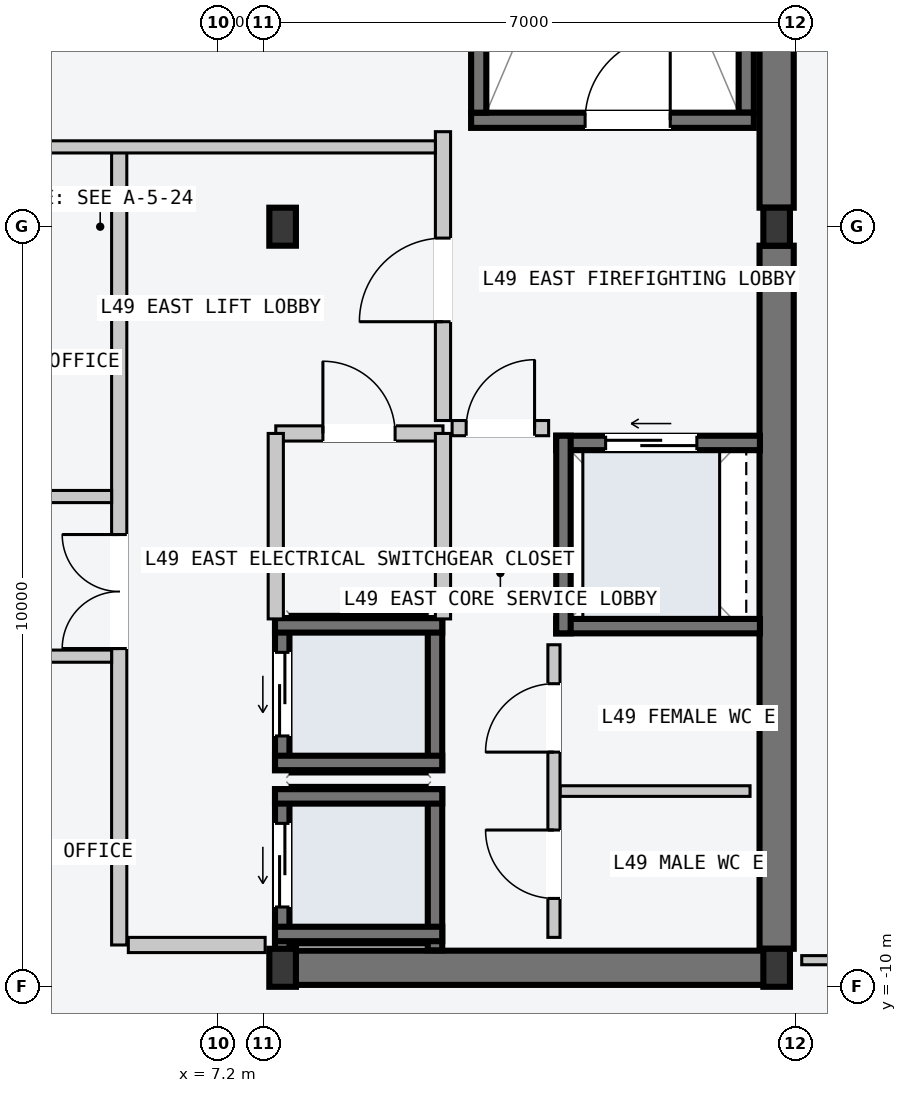
"""IFC4 building model, lengths in metres.
Left out: names, types, materials, properties, quantities, classifications, styles, units other than length and angle.
Written with IfcOpenShell. Run it as: python <this file> out.ifc"""

import sys

from ifc_helpers import new_model, si_unit, direction, frame, frame_2d, origin, origin_2d, place, context, subcontext, project, spatial, rectangle, i_section, extrude, element, fill, save


model = new_model("IFC4")
c1 = context("Model", 3, precision=1e-05, world=origin(), true_north=direction((0.0, 1.0)))
c2 = subcontext(c1, "Body", "Model", "MODEL_VIEW")
j1 = project(units=[si_unit("LENGTHUNIT", "METRE"), si_unit("PLANEANGLEUNIT", "RADIAN")], contexts=[c1])
p1 = place(None, origin())
s1 = spatial("IfcSite", under=j1, at=p1, CompositionType="ELEMENT")
p2 = place(p1, origin())
s2 = spatial("IfcBuilding", under=s1, at=p2, CompositionType="ELEMENT")
p3 = place(p2, frame((0.0, 0.0, 187.5)))
s3 = spatial("IfcBuildingStorey", under=s2, at=p3, CompositionType="ELEMENT", Elevation=187.5)
p4 = place(p3, frame((8.07, -9.75, -0.2), z_axis=(0.0, 0.0, 1.0), x_axis=(1.0, 0.0, 0.0)))
e1 = element("IfcWall", 1, at=p4, inside=s3, PredefinedType="SHEAR", context=c2, shape_type="SweptSolid", body=[
    extrude(rectangle(XDim=6.46, YDim=0.45, at=frame_2d((3.23, 0.0))), origin(), (0.0, 0.0, 1.0), 3.6),
])
for number, where, z_axis, x_axis in (
    (2, (14.55, -9.5, -0.2), (0.0, 0.0, 1.0), (0.0, 1.0, 0.0)),
    (3, (14.55, 0.25, -0.2), (0.0, 0.0, 1.0), (0.0, 1.0, 0.0)),
):
    element("IfcWall", number, at=place(p3, frame(where, z_axis=z_axis, x_axis=x_axis)), inside=s3, PredefinedType="SHEAR", context=c2, shape_type="SweptSolid", body=[
        extrude(rectangle(XDim=9.25, YDim=0.45, at=frame_2d((4.625, 0.0))), origin(), (0.0, 0.0, 1.0), 3.6),
    ])
p5 = place(p3, frame((14.15, 1.5, -0.2), z_axis=(0.0, 0.0, 1.0), x_axis=(0.0, 1.0, 0.0)))
e4 = element("IfcWall", 4, at=p5, inside=s3, PredefinedType="SOLIDWALL", context=c2, shape_type="SweptSolid", body=[
    extrude(rectangle(XDim=7.8, YDim=0.2, at=frame_2d((3.9, 0.0))), origin(), (0.0, 0.0, 1.0), 3.6),
])
p6 = place(p3, frame((10.53, 1.4, -0.2), z_axis=(0.0, 0.0, 1.0), x_axis=(1.0, 0.0, 0.0)))
e5 = element("IfcWall", 5, at=p6, inside=s3, PredefinedType="SOLIDWALL", context=c2, shape_type="SweptSolid", body=[
    extrude(rectangle(XDim=3.72, YDim=0.2, at=frame_2d((1.86, 0.0))), origin(), (0.0, 0.0, 1.0), 3.6),
])
p7 = place(p6, frame((1.5, 0.0, 0.2)))
e6 = element("IfcOpeningElement", 6, at=p7, cuts=e5, PredefinedType="OPENING", context=c2, shape_type="SweptSolid", body=[
    extrude(rectangle(XDim=1.12, YDim=2.18, at=frame_2d((0.56, 1.09))), frame((0.0, 0.11, 0.0), z_axis=(0.0, -1.0, 0.0), x_axis=(1.0, 0.0, 0.0)), (0.0, 0.0, 1.0), 0.22),
])
p8 = place(p3, frame((10.63, 1.5, -0.2), z_axis=(0.0, 0.0, 1.0), x_axis=(0.0, 1.0, 0.0)))
e7 = element("IfcWall", 7, at=p8, inside=s3, PredefinedType="SOLIDWALL", context=c2, shape_type="SweptSolid", body=[
    extrude(rectangle(XDim=7.8, YDim=0.2, at=frame_2d((3.9, 0.0))), origin(), (0.0, 0.0, 1.0), 3.6),
])
for number, where, z_axis, x_axis in (
    (8, (8.05, -9.75, 0.0), (0.0, 0.0, 1.0), (1.0, 0.0, 0.0)),
    (9, (8.05, 0.0, 0.0), (0.0, 0.0, 1.0), (1.0, 0.0, 0.0)),
    (10, (14.55, -9.75, 0.0), (0.0, 0.0, 1.0), (1.0, 0.0, 0.0)),
    (11, (14.55, 0.0, 0.0), (0.0, 0.0, 1.0), (1.0, 0.0, 0.0)),
):
    element("IfcColumn", number, at=place(p3, frame(where, z_axis=z_axis, x_axis=x_axis)), inside=s3, PredefinedType="COLUMN", context=c2, shape_type="SweptSolid", body=[
        extrude(i_section(OverallWidth=0.35, OverallDepth=0.5, WebThickness=0.02, FlangeThickness=0.032, at=origin_2d()), origin(), (0.0, 0.0, 1.0), 3.6),
    ])
p9 = place(p3, frame((8.045, -9.52, -0.2), z_axis=(0.0, 0.0, 1.0), x_axis=(0.0, 1.0, 0.0)))
e12 = element("IfcWall", 12, at=p9, inside=s3, PredefinedType="SOLIDWALL", context=c2, shape_type="SweptSolid", body=[
    extrude(rectangle(XDim=2.12, YDim=0.19, at=frame_2d((1.06, 0.0))), origin(), (0.0, 0.0, 1.0), 3.6),
])
p10 = place(p9, frame((0.57, 0.0, 0.2)))
e13 = element("IfcOpeningElement", 13, at=p10, cuts=e12, PredefinedType="OPENING", context=c2, shape_type="SweptSolid", body=[
    extrude(rectangle(XDim=1.1, YDim=2.2, at=frame_2d((0.55, 1.1))), frame((0.0, 0.105, 0.0), z_axis=(0.0, -1.0, 0.0), x_axis=(1.0, 0.0, 0.0)), (0.0, 0.0, 1.0), 0.21),
])
p11 = place(p3, frame((10.055, -9.52, -0.2), z_axis=(0.0, 0.0, 1.0), x_axis=(0.0, 1.0, 0.0)))
e14 = element("IfcWall", 14, at=p11, inside=s3, PredefinedType="SOLIDWALL", context=c2, shape_type="SweptSolid", body=[
    extrude(rectangle(XDim=2.12, YDim=0.19, at=frame_2d((1.06, 0.0))), origin(), (0.0, 0.0, 1.0), 3.6),
])
for number, where, z_axis, x_axis in (
    (15, (7.95, -7.495, -0.2), (0.0, 0.0, 1.0), (1.0, 0.0, 0.0)),
    (16, (7.95, -9.305, -0.2), (0.0, 0.0, 1.0), (1.0, 0.0, 0.0)),
):
    element("IfcWall", number, at=place(p3, frame(where, z_axis=z_axis, x_axis=x_axis)), inside=s3, PredefinedType="SOLIDWALL", context=c2, shape_type="SweptSolid", body=[
        extrude(rectangle(XDim=2.2, YDim=0.19, at=frame_2d((1.1, 0.0))), origin(), (0.0, 0.0, 1.0), 3.6),
    ])
p12 = place(p3, frame((8.045, -7.15, -0.2), z_axis=(0.0, 0.0, 1.0), x_axis=(0.0, 1.0, 0.0)))
e17 = element("IfcWall", 17, at=p12, inside=s3, PredefinedType="SOLIDWALL", context=c2, shape_type="SweptSolid", body=[
    extrude(rectangle(XDim=2.0, YDim=0.19, at=frame_2d((1.0, 0.0))), origin(), (0.0, 0.0, 1.0), 3.6),
])
p13 = place(p12, frame((0.45, 0.0, 0.2)))
e18 = element("IfcOpeningElement", 18, at=p13, cuts=e17, PredefinedType="OPENING", context=c2, shape_type="SweptSolid", body=[
    extrude(rectangle(XDim=1.1, YDim=2.2, at=frame_2d((0.55, 1.1))), frame((0.0, 0.105, 0.0), z_axis=(0.0, -1.0, 0.0), x_axis=(1.0, 0.0, 0.0)), (0.0, 0.0, 1.0), 0.21),
])
p14 = place(p3, frame((10.055, -7.15, -0.2), z_axis=(0.0, 0.0, 1.0), x_axis=(0.0, 1.0, 0.0)))
e19 = element("IfcWall", 19, at=p14, inside=s3, PredefinedType="SOLIDWALL", context=c2, shape_type="SweptSolid", body=[
    extrude(rectangle(XDim=2.0, YDim=0.19, at=frame_2d((1.0, 0.0))), origin(), (0.0, 0.0, 1.0), 3.6),
])
for number, where, z_axis, x_axis in (
    (20, (7.95, -5.245, -0.2), (0.0, 0.0, 1.0), (1.0, 0.0, 0.0)),
    (21, (7.95, -7.055, -0.2), (0.0, 0.0, 1.0), (1.0, 0.0, 0.0)),
):
    element("IfcWall", number, at=place(p3, frame(where, z_axis=z_axis, x_axis=x_axis)), inside=s3, PredefinedType="SOLIDWALL", context=c2, shape_type="SweptSolid", body=[
        extrude(rectangle(XDim=2.2, YDim=0.19, at=frame_2d((1.1, 0.0))), origin(), (0.0, 0.0, 1.0), 3.6),
    ])
p15 = place(p3, frame((11.65, -2.845, -0.2), z_axis=(0.0, 0.0, 1.0), x_axis=(1.0, 0.0, 0.0)))
e22 = element("IfcWall", 22, at=p15, inside=s3, PredefinedType="SOLIDWALL", context=c2, shape_type="SweptSolid", body=[
    extrude(rectangle(XDim=2.68, YDim=0.19, at=frame_2d((1.34, 0.0))), origin(), (0.0, 0.0, 1.0), 3.6),
])
p16 = place(p15, frame((0.65, 0.0, 0.2)))
e23 = element("IfcOpeningElement", 23, at=p16, cuts=e22, PredefinedType="OPENING", context=c2, shape_type="SweptSolid", body=[
    extrude(rectangle(XDim=1.2, YDim=2.2, at=frame_2d((0.6, 1.1))), frame((0.0, 0.105, 0.0), z_axis=(0.0, -1.0, 0.0), x_axis=(1.0, 0.0, 0.0)), (0.0, 0.0, 1.0), 0.21),
])
p17 = place(p3, frame((11.65, -5.255, -0.2), z_axis=(0.0, 0.0, 1.0), x_axis=(1.0, 0.0, 0.0)))
e24 = element("IfcWall", 24, at=p17, inside=s3, PredefinedType="SOLIDWALL", context=c2, shape_type="SweptSolid", body=[
    extrude(rectangle(XDim=2.68, YDim=0.19, at=frame_2d((1.34, 0.0))), origin(), (0.0, 0.0, 1.0), 3.6),
])
p18 = place(p3, frame((11.745, -5.35, -0.2), z_axis=(0.0, 0.0, 1.0), x_axis=(0.0, 1.0, 0.0)))
e25 = element("IfcWall", 25, at=p18, inside=s3, PredefinedType="SOLIDWALL", context=c2, shape_type="SweptSolid", body=[
    extrude(rectangle(XDim=2.6, YDim=0.19, at=frame_2d((1.3, 0.0))), origin(), (0.0, 0.0, 1.0), 3.6),
])
p19 = place(p3, frame((5.9, -9.45, 0.0), z_axis=(0.0, 0.0, 1.0), x_axis=(0.0, 1.0, 0.0)))
e26 = element("IfcWall", 26, at=p19, inside=s3, PredefinedType="PARTITIONING", context=c2, shape_type="SweptSolid", body=[
    extrude(rectangle(XDim=10.5, YDim=0.2, at=frame_2d((5.25, 0.0))), origin(), (0.0, 0.0, 1.0), 3.4),
])
p20 = place(p19, frame((3.9, 0.0, 0.0)))
e27 = element("IfcOpeningElement", 27, at=p20, cuts=e26, PredefinedType="OPENING", context=c2, shape_type="SweptSolid", body=[
    extrude(rectangle(XDim=1.5, YDim=2.2, at=frame_2d((0.75, 1.1))), frame((0.0, 0.11, 0.0), z_axis=(0.0, -1.0, 0.0), x_axis=(1.0, 0.0, 0.0)), (0.0, 0.0, 1.0), 0.22),
])
p21 = place(p3, frame((6.02, -9.45, 0.0), z_axis=(0.0, 0.0, 1.0), x_axis=(1.0, 0.0, 0.0)))
e28 = element("IfcWall", 28, at=p21, inside=s3, PredefinedType="PARTITIONING", context=c2, shape_type="SweptSolid", body=[
    extrude(rectangle(XDim=1.8, YDim=0.2, at=frame_2d((0.9, 0.0))), origin(), (0.0, 0.0, 1.0), 3.4),
])
p22 = place(p3, frame((10.16, -2.55, 0.0), z_axis=(0.0, 0.0, 1.0), x_axis=(0.0, 1.0, 0.0)))
e29 = element("IfcWall", 29, at=p22, inside=s3, PredefinedType="PARTITIONING", context=c2, shape_type="SweptSolid", body=[
    extrude(rectangle(XDim=3.8, YDim=0.2, at=frame_2d((1.9, 0.0))), origin(), (0.0, 0.0, 1.0), 3.4),
])
p23 = place(p22, frame((1.3, 0.0, 0.0)))
e30 = element("IfcOpeningElement", 30, at=p23, cuts=e29, PredefinedType="OPENING", context=c2, shape_type="SweptSolid", body=[
    extrude(rectangle(XDim=1.1, YDim=2.15, at=frame_2d((0.55, 1.075))), frame((0.0, 0.11, 0.0), z_axis=(0.0, -1.0, 0.0), x_axis=(1.0, 0.0, 0.0)), (0.0, 0.0, 1.0), 0.22),
])
p24 = place(p3, frame((10.28, -2.65, 0.0), z_axis=(0.0, 0.0, 1.0), x_axis=(1.0, 0.0, 0.0)))
e31 = element("IfcWall", 31, at=p24, inside=s3, PredefinedType="PARTITIONING", context=c2, shape_type="SweptSolid", body=[
    extrude(rectangle(XDim=1.27, YDim=0.2, at=frame_2d((0.635, 0.0))), origin(), (0.0, 0.0, 1.0), 3.4),
])
p25 = place(p24, frame((0.185, 0.0, 0.0)))
e32 = element("IfcOpeningElement", 32, at=p25, cuts=e31, PredefinedType="OPENING", context=c2, shape_type="SweptSolid", body=[
    extrude(rectangle(XDim=0.9, YDim=2.15, at=frame_2d((0.45, 1.075))), frame((0.0, 0.11, 0.0), z_axis=(0.0, -1.0, 0.0), x_axis=(1.0, 0.0, 0.0)), (0.0, 0.0, 1.0), 0.22),
])
p26 = place(p3, frame((7.96, -2.72, 0.0), z_axis=(0.0, 0.0, 1.0), x_axis=(1.0, 0.0, 0.0)))
e33 = element("IfcWall", 33, at=p26, inside=s3, PredefinedType="PARTITIONING", context=c2, shape_type="SweptSolid", body=[
    extrude(rectangle(XDim=2.2, YDim=0.2, at=frame_2d((1.1, 0.0))), origin(), (0.0, 0.0, 1.0), 3.4),
])
p27 = place(p26, frame((0.62, 0.0, 0.0)))
e34 = element("IfcOpeningElement", 34, at=p27, cuts=e33, PredefinedType="OPENING", context=c2, shape_type="SweptSolid", body=[
    extrude(rectangle(XDim=0.95, YDim=2.1, at=frame_2d((0.475, 1.05))), frame((0.0, 0.11, 0.0), z_axis=(0.0, -1.0, 0.0), x_axis=(1.0, 0.0, 0.0)), (0.0, 0.0, 1.0), 0.22),
])
for number, where, z_axis, x_axis in (
    (35, (7.96, -5.16, 0.0), (0.0, 0.0, 1.0), (0.0, 1.0, 0.0)),
    (36, (10.16, -5.16, 0.0), (0.0, 0.0, 1.0), (0.0, 1.0, 0.0)),
):
    element("IfcWall", number, at=place(p3, frame(where, z_axis=z_axis, x_axis=x_axis)), inside=s3, PredefinedType="PARTITIONING", context=c2, shape_type="SweptSolid", body=[
        extrude(rectangle(XDim=2.44, YDim=0.2, at=frame_2d((1.22, 0.0))), origin(), (0.0, 0.0, 1.0), 3.4),
    ])
p28 = place(p3, frame((11.7, -7.425, 0.0), z_axis=(0.0, 0.0, 1.0), x_axis=(1.0, 0.0, 0.0)))
e37 = element("IfcWall", 37, at=p28, inside=s3, PredefinedType="PARTITIONING", context=c2, shape_type="SweptSolid", body=[
    extrude(rectangle(XDim=2.5, YDim=0.14, at=frame_2d((1.25, 0.0))), origin(), (0.0, 0.0, 1.0), 3.4),
])
p29 = place(p3, frame((11.62, -9.35, 0.0), z_axis=(0.0, 0.0, 1.0), x_axis=(0.0, 1.0, 0.0)))
e38 = element("IfcWall", 38, at=p29, inside=s3, PredefinedType="PARTITIONING", context=c2, shape_type="SweptSolid", body=[
    extrude(rectangle(XDim=3.85, YDim=0.16, at=frame_2d((1.925, 0.0))), origin(), (0.0, 0.0, 1.0), 3.4),
])
p30 = place(p29, frame((0.512, 0.0, 0.0)))
e39 = element("IfcOpeningElement", 39, at=p30, cuts=e38, PredefinedType="OPENING", context=c2, shape_type="SweptSolid", body=[
    extrude(rectangle(XDim=0.9, YDim=2.15, at=frame_2d((0.45, 1.075))), frame((0.0, 0.09, 0.0), z_axis=(0.0, -1.0, 0.0), x_axis=(1.0, 0.0, 0.0)), (0.0, 0.0, 1.0), 0.18),
])
p31 = place(p29, frame((2.438, 0.0, 0.0)))
e40 = element("IfcOpeningElement", 40, at=p31, cuts=e38, PredefinedType="OPENING", context=c2, shape_type="SweptSolid", body=[
    extrude(rectangle(XDim=0.9, YDim=2.15, at=frame_2d((0.45, 1.075))), frame((0.0, 0.09, 0.0), z_axis=(0.0, -1.0, 0.0), x_axis=(1.0, 0.0, 0.0)), (0.0, 0.0, 1.0), 0.18),
])
p32 = place(p3, frame((1.26, 1.05, 0.0), z_axis=(0.0, 0.0, 1.0), x_axis=(1.0, 0.0, 0.0)))
e41 = element("IfcWall", 41, at=p32, inside=s3, PredefinedType="PARTITIONING", context=c2, shape_type="SweptSolid", body=[
    extrude(rectangle(XDim=8.8, YDim=0.16, at=frame_2d((4.4, 0.0))), origin(), (0.0, 0.0, 1.0), 3.4),
])
for number, where, z_axis, x_axis in (
    (42, (1.26, -3.55, 0.0), (0.0, 0.0, 1.0), (1.0, 0.0, 0.0)),
    (43, (1.26, -5.65, 0.0), (0.0, 0.0, 1.0), (1.0, 0.0, 0.0)),
):
    element("IfcWall", number, at=place(p3, frame(where, z_axis=z_axis, x_axis=x_axis)), inside=s3, PredefinedType="PARTITIONING", context=c2, shape_type="SweptSolid", body=[
        extrude(rectangle(XDim=4.54, YDim=0.16, at=frame_2d((2.27, 0.0))), origin(), (0.0, 0.0, 1.0), 3.4),
    ])
p33 = place(p3, frame((14.88, -9.65, 0.0), z_axis=(0.0, 0.0, 1.0), x_axis=(1.0, 0.0, 0.0)))
e44 = element("IfcWall", 44, at=p33, inside=s3, PredefinedType="PARTITIONING", context=c2, shape_type="SweptSolid", body=[
    extrude(rectangle(XDim=5.68, YDim=0.12, at=frame_2d((2.84, 0.0))), origin(), (0.0, 0.0, 1.0), 2.75),
])
p34 = place(p33, frame((2.36, 0.0, 0.0)))
e45 = element("IfcOpeningElement", 45, at=p34, cuts=e44, PredefinedType="OPENING", context=c2, shape_type="SweptSolid", body=[
    extrude(rectangle(XDim=0.96, YDim=2.18, at=frame_2d((0.48, 1.09))), frame((0.0, 0.07, 0.0), z_axis=(0.0, -1.0, 0.0), x_axis=(1.0, 0.0, 0.0)), (0.0, 0.0, 1.0), 0.14),
])
p35 = place(p7, origin())
e46 = element("IfcDoor", 46, at=p35, inside=s3, OperationType="SINGLE_SWING_RIGHT", PredefinedType="DOOR", context=c2, shape_type="SweptSolid", body=[
    extrude(rectangle(XDim=1.12, YDim=2.18, at=frame_2d((0.56, 1.09))), frame((0.0, 0.025, 0.0), z_axis=(0.0, -1.0, 0.0), x_axis=(1.0, 0.0, 0.0)), (0.0, 0.0, 1.0), 0.05),
])
fill(e6, e46)
p36 = place(p10, origin())
e47 = element("IfcDoor", 47, at=p36, inside=s3, OperationType="SLIDING_TO_LEFT", PredefinedType="DOOR", context=c2, shape_type="SweptSolid", body=[
    extrude(rectangle(XDim=1.1, YDim=2.2, at=frame_2d((0.55, 1.1))), frame((0.0, 0.025, 0.0), z_axis=(0.0, -1.0, 0.0), x_axis=(1.0, 0.0, 0.0)), (0.0, 0.0, 1.0), 0.05),
])
fill(e13, e47)
p37 = place(p13, origin())
e48 = element("IfcDoor", 48, at=p37, inside=s3, OperationType="SLIDING_TO_LEFT", PredefinedType="DOOR", context=c2, shape_type="SweptSolid", body=[
    extrude(rectangle(XDim=1.1, YDim=2.2, at=frame_2d((0.55, 1.1))), frame((0.0, 0.025, 0.0), z_axis=(0.0, -1.0, 0.0), x_axis=(1.0, 0.0, 0.0)), (0.0, 0.0, 1.0), 0.05),
])
fill(e18, e48)
p38 = place(p16, origin())
e49 = element("IfcDoor", 49, at=p38, inside=s3, OperationType="SLIDING_TO_LEFT", PredefinedType="DOOR", context=c2, shape_type="SweptSolid", body=[
    extrude(rectangle(XDim=1.2, YDim=2.2, at=frame_2d((0.6, 1.1))), frame((0.0, 0.025, 0.0), z_axis=(0.0, -1.0, 0.0), x_axis=(1.0, 0.0, 0.0)), (0.0, 0.0, 1.0), 0.05),
])
fill(e23, e49)
p39 = place(p20, origin())
e50 = element("IfcDoor", 50, at=p39, inside=s3, OperationType="DOUBLE_DOOR_SINGLE_SWING", PredefinedType="DOOR", context=c2, shape_type="SweptSolid", body=[
    extrude(rectangle(XDim=1.5, YDim=2.2, at=frame_2d((0.75, 1.1))), frame((0.0, 0.025, 0.0), z_axis=(0.0, -1.0, 0.0), x_axis=(1.0, 0.0, 0.0)), (0.0, 0.0, 1.0), 0.05),
])
fill(e27, e50)
p40 = place(p23, origin())
e51 = element("IfcDoor", 51, at=p40, inside=s3, OperationType="SINGLE_SWING_LEFT", PredefinedType="DOOR", context=c2, shape_type="SweptSolid", body=[
    extrude(rectangle(XDim=1.1, YDim=2.15, at=frame_2d((0.55, 1.075))), frame((0.0, 0.025, 0.0), z_axis=(0.0, -1.0, 0.0), x_axis=(1.0, 0.0, 0.0)), (0.0, 0.0, 1.0), 0.05),
])
fill(e30, e51)
p41 = place(p25, origin())
e52 = element("IfcDoor", 52, at=p41, inside=s3, OperationType="SINGLE_SWING_RIGHT", PredefinedType="DOOR", context=c2, shape_type="SweptSolid", body=[
    extrude(rectangle(XDim=0.9, YDim=2.15, at=frame_2d((0.45, 1.075))), frame((0.0, 0.025, 0.0), z_axis=(0.0, -1.0, 0.0), x_axis=(1.0, 0.0, 0.0)), (0.0, 0.0, 1.0), 0.05),
])
fill(e32, e52)
p42 = place(p27, origin())
e53 = element("IfcDoor", 53, at=p42, inside=s3, OperationType="SINGLE_SWING_LEFT", PredefinedType="DOOR", context=c2, shape_type="SweptSolid", body=[
    extrude(rectangle(XDim=0.95, YDim=2.1, at=frame_2d((0.475, 1.05))), frame((0.0, 0.025, 0.0), z_axis=(0.0, -1.0, 0.0), x_axis=(1.0, 0.0, 0.0)), (0.0, 0.0, 1.0), 0.05),
])
fill(e34, e53)
p43 = place(p30, origin())
e54 = element("IfcDoor", 54, at=p43, inside=s3, OperationType="SINGLE_SWING_RIGHT", PredefinedType="DOOR", context=c2, shape_type="SweptSolid", body=[
    extrude(rectangle(XDim=0.9, YDim=2.15, at=frame_2d((0.45, 1.075))), frame((0.0, 0.025, 0.0), z_axis=(0.0, -1.0, 0.0), x_axis=(1.0, 0.0, 0.0)), (0.0, 0.0, 1.0), 0.05),
])
fill(e39, e54)
p44 = place(p31, origin())
e55 = element("IfcDoor", 55, at=p44, inside=s3, OperationType="SINGLE_SWING_LEFT", PredefinedType="DOOR", context=c2, shape_type="SweptSolid", body=[
    extrude(rectangle(XDim=0.9, YDim=2.15, at=frame_2d((0.45, 1.075))), frame((0.0, 0.025, 0.0), z_axis=(0.0, -1.0, 0.0), x_axis=(1.0, 0.0, 0.0)), (0.0, 0.0, 1.0), 0.05),
])
fill(e40, e55)
save(model, sys.argv[1])
